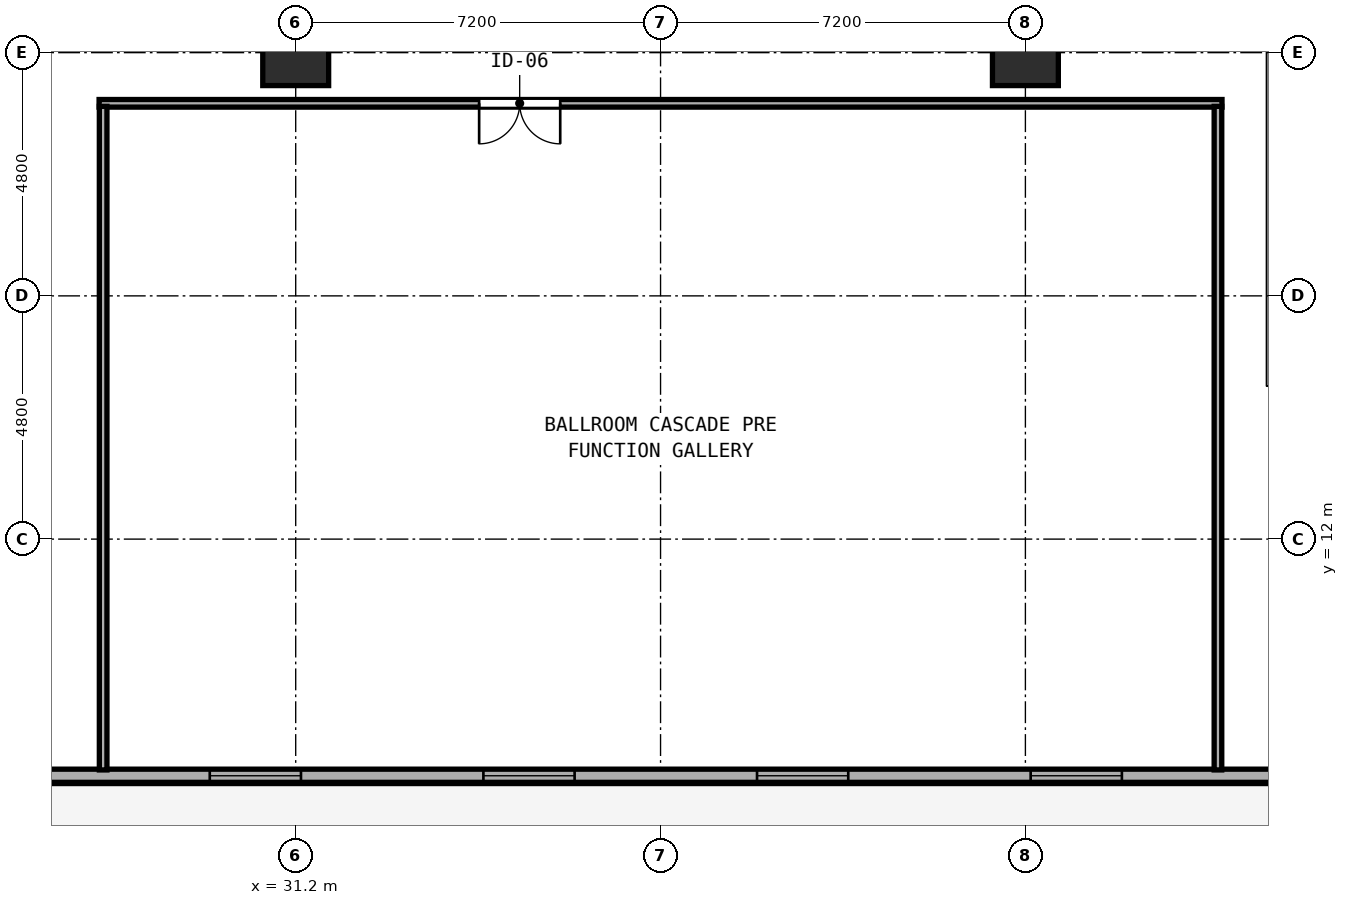
"""IFC4 building model, lengths in metres.
Left out: names, types, materials, properties, quantities, classifications, styles, units other than length and angle.
Written with IfcOpenShell. Run it as: python <this file> out.ifc"""

import sys

from ifc_helpers import new_model, si_unit, direction, frame, frame_2d, origin, origin_2d, place, context, subcontext, project, spatial, rectangle, hollow_rectangle, extrude, element, fill, save


model = new_model("IFC4")
c1 = context("Model", 3, precision=1e-05, world=origin(), true_north=direction((0.0, 1.0)))
c2 = subcontext(c1, "Body", "Model", "MODEL_VIEW")
j1 = project(units=[si_unit("LENGTHUNIT", "METRE"), si_unit("PLANEANGLEUNIT", "RADIAN")], contexts=[c1])
p1 = place(None, origin())
s1 = spatial("IfcSite", under=j1, at=p1, CompositionType="ELEMENT")
p2 = place(p1, origin())
s2 = spatial("IfcBuilding", under=s1, at=p2, CompositionType="ELEMENT")
p3 = place(p2, frame((0.0, 0.0, 10.2)))
s3 = spatial("IfcBuildingStorey", under=s2, at=p3, CompositionType="ELEMENT", Elevation=10.2)
for number, where, z_axis, x_axis in (
    (1, (31.2, 21.6, 0.0), (0.0, 0.0, 1.0), (1.0, 0.0, 0.0)),
    (2, (45.6, 21.6, 0.0), (0.0, 0.0, 1.0), (1.0, 0.0, 0.0)),
):
    element("IfcColumn", number, at=place(p3, frame(where, z_axis=z_axis, x_axis=x_axis)), inside=s3, PredefinedType="COLUMN", context=c2, shape_type="SweptSolid", body=[
        extrude(hollow_rectangle(XDim=1.3, YDim=1.3, WallThickness=0.048, at=origin_2d()), origin(), (0.0, 0.0, 1.0), 5.4),
    ])
p4 = place(p3, frame((18.004, 7.33, 0.0), z_axis=(0.0, 0.0, 1.0), x_axis=(1.0, 0.0, 0.0)))
e3 = element("IfcWall", 3, at=p4, inside=s3, PredefinedType="SOLIDWALL", context=c2, shape_type="SweptSolid", body=[
    extrude(rectangle(XDim=40.792, YDim=0.26, at=frame_2d((20.396, 0.0))), origin(), (0.0, 0.0, 1.0), 5.16),
])
p5 = place(p4, frame((0.7, 0.0, 0.85)))
e4 = element("IfcOpeningElement", 4, at=p5, cuts=e3, PredefinedType="OPENING", context=c2, shape_type="SweptSolid", body=[
    extrude(rectangle(XDim=1.8, YDim=2.2, at=frame_2d((0.9, 1.1))), frame((0.0, 0.14, 0.0), z_axis=(0.0, -1.0, 0.0), x_axis=(1.0, 0.0, 0.0)), (0.0, 0.0, 1.0), 0.28),
])
p6 = place(p4, frame((6.1, 0.0, 0.85)))
e5 = element("IfcOpeningElement", 5, at=p6, cuts=e3, PredefinedType="OPENING", context=c2, shape_type="SweptSolid", body=[
    extrude(rectangle(XDim=1.8, YDim=2.2, at=frame_2d((0.9, 1.1))), frame((0.0, 0.14, 0.0), z_axis=(0.0, -1.0, 0.0), x_axis=(1.0, 0.0, 0.0)), (0.0, 0.0, 1.0), 0.28),
])
p7 = place(p4, frame((11.5, 0.0, 0.85)))
e6 = element("IfcOpeningElement", 6, at=p7, cuts=e3, PredefinedType="OPENING", context=c2, shape_type="SweptSolid", body=[
    extrude(rectangle(XDim=1.8, YDim=2.2, at=frame_2d((0.9, 1.1))), frame((0.0, 0.14, 0.0), z_axis=(0.0, -1.0, 0.0), x_axis=(1.0, 0.0, 0.0)), (0.0, 0.0, 1.0), 0.28),
])
p8 = place(p4, frame((16.9, 0.0, 0.85)))
e7 = element("IfcOpeningElement", 7, at=p8, cuts=e3, PredefinedType="OPENING", context=c2, shape_type="SweptSolid", body=[
    extrude(rectangle(XDim=1.8, YDim=2.2, at=frame_2d((0.9, 1.1))), frame((0.0, 0.14, 0.0), z_axis=(0.0, -1.0, 0.0), x_axis=(1.0, 0.0, 0.0)), (0.0, 0.0, 1.0), 0.28),
])
p9 = place(p4, frame((22.3, 0.0, 0.85)))
e8 = element("IfcOpeningElement", 8, at=p9, cuts=e3, PredefinedType="OPENING", context=c2, shape_type="SweptSolid", body=[
    extrude(rectangle(XDim=1.8, YDim=2.2, at=frame_2d((0.9, 1.1))), frame((0.0, 0.14, 0.0), z_axis=(0.0, -1.0, 0.0), x_axis=(1.0, 0.0, 0.0)), (0.0, 0.0, 1.0), 0.28),
])
p10 = place(p4, frame((27.7, 0.0, 0.85)))
e9 = element("IfcOpeningElement", 9, at=p10, cuts=e3, PredefinedType="OPENING", context=c2, shape_type="SweptSolid", body=[
    extrude(rectangle(XDim=1.8, YDim=2.2, at=frame_2d((0.9, 1.1))), frame((0.0, 0.14, 0.0), z_axis=(0.0, -1.0, 0.0), x_axis=(1.0, 0.0, 0.0)), (0.0, 0.0, 1.0), 0.28),
])
p11 = place(p4, frame((33.1, 0.0, 0.85)))
e10 = element("IfcOpeningElement", 10, at=p11, cuts=e3, PredefinedType="OPENING", context=c2, shape_type="SweptSolid", body=[
    extrude(rectangle(XDim=1.8, YDim=2.2, at=frame_2d((0.9, 1.1))), frame((0.0, 0.14, 0.0), z_axis=(0.0, -1.0, 0.0), x_axis=(1.0, 0.0, 0.0)), (0.0, 0.0, 1.0), 0.28),
])
p12 = place(p3, frame((27.32, 20.6, 0.0), z_axis=(0.0, 0.0, 1.0), x_axis=(1.0, 0.0, 0.0)))
e11 = element("IfcWall", 11, at=p12, inside=s3, PredefinedType="PARTITIONING", context=c2, shape_type="SweptSolid", body=[
    extrude(rectangle(XDim=22.16, YDim=0.15, at=frame_2d((11.08, 0.0))), origin(), (0.0, 0.0, 1.0), 5.16),
])
p13 = place(p12, frame((9.1, 0.0, 0.0), z_axis=(0.0, 0.0, 1.0), x_axis=(-1.0, 0.0, 0.0)))
e12 = element("IfcOpeningElement", 12, at=p13, cuts=e11, PredefinedType="OPENING", context=c2, shape_type="SweptSolid", body=[
    extrude(rectangle(XDim=1.6, YDim=2.25, at=frame_2d((0.8, 1.125))), frame((0.0, 0.085, 0.0), z_axis=(0.0, -1.0, 0.0), x_axis=(1.0, 0.0, 0.0)), (0.0, 0.0, 1.0), 0.17),
])
for number, where, z_axis, x_axis in (
    (13, (27.4, 7.445, 0.0), (0.0, 0.0, 1.0), (0.0, 1.0, 0.0)),
    (14, (49.4, 7.445, 0.0), (0.0, 0.0, 1.0), (0.0, 1.0, 0.0)),
):
    element("IfcWall", number, at=place(p3, frame(where, z_axis=z_axis, x_axis=x_axis)), inside=s3, PredefinedType="PARTITIONING", context=c2, shape_type="SweptSolid", body=[
        extrude(rectangle(XDim=13.095, YDim=0.15, at=frame_2d((6.547, 0.0))), origin(), (0.0, 0.0, 1.0), 5.16),
    ])
p14 = place(p7, origin())
e15 = element("IfcWindow", 15, at=p14, inside=s3, PartitioningType="SINGLE_PANEL", PredefinedType="WINDOW", context=c2, shape_type="SweptSolid", body=[
    extrude(rectangle(XDim=1.8, YDim=2.2, at=frame_2d((0.9, 1.1))), frame((0.0, 0.03, 0.0), z_axis=(0.0, -1.0, 0.0), x_axis=(1.0, 0.0, 0.0)), (0.0, 0.0, 1.0), 0.06),
])
fill(e6, e15)
p15 = place(p8, origin())
e16 = element("IfcWindow", 16, at=p15, inside=s3, PartitioningType="SINGLE_PANEL", PredefinedType="WINDOW", context=c2, shape_type="SweptSolid", body=[
    extrude(rectangle(XDim=1.8, YDim=2.2, at=frame_2d((0.9, 1.1))), frame((0.0, 0.03, 0.0), z_axis=(0.0, -1.0, 0.0), x_axis=(1.0, 0.0, 0.0)), (0.0, 0.0, 1.0), 0.06),
])
fill(e7, e16)
p16 = place(p9, origin())
e17 = element("IfcWindow", 17, at=p16, inside=s3, PartitioningType="SINGLE_PANEL", PredefinedType="WINDOW", context=c2, shape_type="SweptSolid", body=[
    extrude(rectangle(XDim=1.8, YDim=2.2, at=frame_2d((0.9, 1.1))), frame((0.0, 0.03, 0.0), z_axis=(0.0, -1.0, 0.0), x_axis=(1.0, 0.0, 0.0)), (0.0, 0.0, 1.0), 0.06),
])
fill(e8, e17)
p17 = place(p10, origin())
e18 = element("IfcWindow", 18, at=p17, inside=s3, PartitioningType="SINGLE_PANEL", PredefinedType="WINDOW", context=c2, shape_type="SweptSolid", body=[
    extrude(rectangle(XDim=1.8, YDim=2.2, at=frame_2d((0.9, 1.1))), frame((0.0, 0.03, 0.0), z_axis=(0.0, -1.0, 0.0), x_axis=(1.0, 0.0, 0.0)), (0.0, 0.0, 1.0), 0.06),
])
fill(e9, e18)
p18 = place(p13, origin())
e19 = element("IfcDoor", 19, at=p18, inside=s3, OperationType="DOUBLE_DOOR_SINGLE_SWING", PredefinedType="DOOR", context=c2, shape_type="SweptSolid", body=[
    extrude(rectangle(XDim=1.6, YDim=2.25, at=frame_2d((0.8, 1.125))), frame((0.0, 0.025, 0.0), z_axis=(0.0, -1.0, 0.0), x_axis=(1.0, 0.0, 0.0)), (0.0, 0.0, 1.0), 0.05),
])
fill(e12, e19)
save(model, sys.argv[1])
